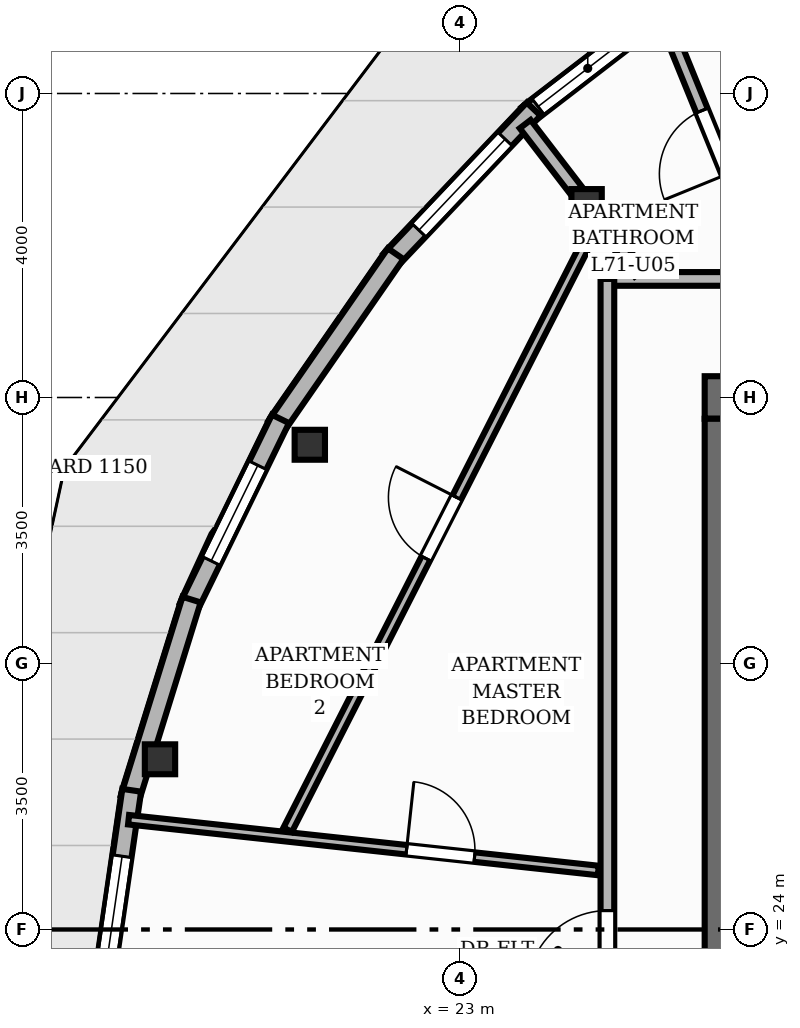
"""IFC4 building model, lengths in metres.
Left out: names, types, materials, properties, quantities, classifications, styles, units other than length and angle.
Written with IfcOpenShell. Run it as: python <this file> out.ifc"""

import sys

from ifc_helpers import new_model, si_unit, direction, frame, frame_2d, origin, origin_2d, place, context, subcontext, project, spatial, rectangle, i_section, extrude, element, fill, save


model = new_model("IFC4")
c1 = context("Model", 3, precision=1e-05, world=origin(), true_north=direction((0.0, 1.0)))
c2 = subcontext(c1, "Body", "Model", "MODEL_VIEW")
j1 = project(units=[si_unit("LENGTHUNIT", "METRE"), si_unit("PLANEANGLEUNIT", "RADIAN")], contexts=[c1])
p1 = place(None, origin())
s1 = spatial("IfcSite", under=j1, at=p1, CompositionType="ELEMENT")
p2 = place(p1, origin())
s2 = spatial("IfcBuilding", under=s1, at=p2, CompositionType="ELEMENT")
p3 = place(p2, frame((0.0, 0.0, 236.64)))
s3 = spatial("IfcBuildingStorey", under=s2, at=p3, CompositionType="ELEMENT", Elevation=236.64)
p4 = place(p3, frame((26.22, 31.0, 0.0), z_axis=(0.0, 0.0, 1.0), x_axis=(1.0, 0.0, 0.0)))
e1 = element("IfcWall", 1, at=p4, inside=s3, PredefinedType="SHEAR", context=c2, shape_type="SweptSolid", body=[
    extrude(rectangle(XDim=11.56, YDim=0.56, at=frame_2d((5.78, 0.0))), origin(), (0.0, 0.0, 1.0), 3.2),
])
p5 = place(p4, frame((8.18, 0.0, 0.0)))
e2 = element("IfcOpeningElement", 2, at=p5, cuts=e1, PredefinedType="OPENING", context=c2, shape_type="SweptSolid", body=[
    extrude(rectangle(XDim=1.1, YDim=2.15, at=frame_2d((0.55, 1.075))), frame((0.0, 0.29, 0.0), z_axis=(0.0, -1.0, 0.0), x_axis=(1.0, 0.0, 0.0)), (0.0, 0.0, 1.0), 0.58),
])
p6 = place(p4, frame((0.805, 0.0, 0.0)))
e3 = element("IfcOpeningElement", 3, at=p6, cuts=e1, PredefinedType="OPENING", context=c2, shape_type="SweptSolid", body=[
    extrude(rectangle(XDim=1.05, YDim=2.15, at=frame_2d((0.525, 1.075))), frame((0.0, 0.29, 0.0), z_axis=(0.0, -1.0, 0.0), x_axis=(1.0, 0.0, 0.0)), (0.0, 0.0, 1.0), 0.58),
])
p7 = place(p4, frame((2.555, 0.0, 0.0)))
e4 = element("IfcOpeningElement", 4, at=p7, cuts=e1, PredefinedType="OPENING", context=c2, shape_type="SweptSolid", body=[
    extrude(rectangle(XDim=1.05, YDim=2.15, at=frame_2d((0.525, 1.075))), frame((0.0, 0.29, 0.0), z_axis=(0.0, -1.0, 0.0), x_axis=(1.0, 0.0, 0.0)), (0.0, 0.0, 1.0), 0.58),
])
p8 = place(p4, frame((4.305, 0.0, 0.0)))
e5 = element("IfcOpeningElement", 5, at=p8, cuts=e1, PredefinedType="OPENING", context=c2, shape_type="SweptSolid", body=[
    extrude(rectangle(XDim=1.05, YDim=2.15, at=frame_2d((0.525, 1.075))), frame((0.0, 0.29, 0.0), z_axis=(0.0, -1.0, 0.0), x_axis=(1.0, 0.0, 0.0)), (0.0, 0.0, 1.0), 0.58),
])
p9 = place(p3, frame((26.5, 17.28, 0.0), z_axis=(0.0, 0.0, 1.0), x_axis=(0.0, 1.0, 0.0)))
e6 = element("IfcWall", 6, at=p9, inside=s3, PredefinedType="SHEAR", context=c2, shape_type="SweptSolid", body=[
    extrude(rectangle(XDim=13.44, YDim=0.56, at=frame_2d((6.72, 0.0))), origin(), (0.0, 0.0, 1.0), 3.2),
])
for number, where, z_axis, x_axis in (
    (7, (24.667, 33.545, 0.0), (0.0, 0.0, 1.0), (1.0, 0.0, 0.0)),
    (8, (21.025, 30.378, 0.0), (0.0, 0.0, 1.0), (1.0, 0.0, 0.0)),
    (9, (19.054, 26.24, 0.0), (0.0, 0.0, 1.0), (1.0, 0.0, 0.0)),
):
    element("IfcColumn", number, at=place(p3, frame(where, z_axis=z_axis, x_axis=x_axis)), inside=s3, PredefinedType="COLUMN", context=c2, shape_type="SweptSolid", body=[
        extrude(i_section(OverallWidth=0.399, OverallDepth=0.394, WebThickness=0.023, FlangeThickness=0.037, at=origin_2d()), origin(), (0.0, 0.0, 1.0), 3.2),
    ])
p10 = place(p3, frame((23.889, 34.721, 0.0), z_axis=(0.0, 0.0, 1.0), x_axis=(0.792543354822, 0.609815571076, 0.0)))
e10 = element("IfcWall", 10, at=p10, inside=s3, PredefinedType="SOLIDWALL", context=c2, shape_type="SweptSolid", body=[
    extrude(rectangle(XDim=2.702, YDim=0.25, at=frame_2d((1.351, 0.0))), origin(), (0.0, 0.0, 1.0), 2.96),
])
p11 = place(p10, frame((0.175, 0.0, 0.85)))
e11 = element("IfcOpeningElement", 11, at=p11, cuts=e10, PredefinedType="OPENING", context=c2, shape_type="SweptSolid", body=[
    extrude(rectangle(XDim=1.65, YDim=1.52, at=frame_2d((0.825, 0.76))), frame((0.0, 0.135, 0.0), z_axis=(0.0, -1.0, 0.0), x_axis=(1.0, 0.0, 0.0)), (0.0, 0.0, 1.0), 0.27),
])
p12 = place(p3, frame((22.085, 32.807, 0.0), z_axis=(0.0, 0.0, 1.0), x_axis=(0.688046261031, 0.725666826223, 0.0)))
e12 = element("IfcWall", 12, at=p12, inside=s3, PredefinedType="SOLIDWALL", context=c2, shape_type="SweptSolid", body=[
    extrude(rectangle(XDim=2.739, YDim=0.25, at=frame_2d((1.369, 0.0))), origin(), (0.0, 0.0, 1.0), 2.96),
])
p13 = place(p12, frame((0.544, 0.0, 0.85)))
e13 = element("IfcOpeningElement", 13, at=p13, cuts=e12, PredefinedType="OPENING", context=c2, shape_type="SweptSolid", body=[
    extrude(rectangle(XDim=1.65, YDim=1.55, at=frame_2d((0.825, 0.775))), frame((0.0, 0.135, 0.0), z_axis=(0.0, -1.0, 0.0), x_axis=(1.0, 0.0, 0.0)), (0.0, 0.0, 1.0), 0.27),
])
p14 = place(p3, frame((20.584, 30.624, 0.0), z_axis=(0.0, 0.0, 1.0), x_axis=(0.569421689582, 0.822045582333, 0.0)))
e14 = element("IfcWall", 14, at=p14, inside=s3, PredefinedType="SOLIDWALL", context=c2, shape_type="SweptSolid", body=[
    extrude(rectangle(XDim=2.758, YDim=0.25, at=frame_2d((1.379, 0.0))), origin(), (0.0, 0.0, 1.0), 2.96),
])
p15 = place(p3, frame((19.429, 28.239, 0.0), z_axis=(0.0, 0.0, 1.0), x_axis=(0.438517804861, 0.898722501565, 0.0)))
e15 = element("IfcWall", 15, at=p15, inside=s3, PredefinedType="SOLIDWALL", context=c2, shape_type="SweptSolid", body=[
    extrude(rectangle(XDim=2.758, YDim=0.25, at=frame_2d((1.379, 0.0))), origin(), (0.0, 0.0, 1.0), 2.96),
])
p16 = place(p15, frame((0.679, 0.0, 0.85)))
e16 = element("IfcOpeningElement", 16, at=p16, cuts=e15, PredefinedType="OPENING", context=c2, shape_type="SweptSolid", body=[
    extrude(rectangle(XDim=1.4, YDim=1.55, at=frame_2d((0.7, 0.775))), frame((0.0, 0.135, 0.0), z_axis=(0.0, -1.0, 0.0), x_axis=(1.0, 0.0, 0.0)), (0.0, 0.0, 1.0), 0.27),
])
p17 = place(p3, frame((18.657, 25.725, 0.0), z_axis=(0.0, 0.0, 1.0), x_axis=(0.29642164717, 0.955057174775, 0.0)))
e17 = element("IfcWall", 17, at=p17, inside=s3, PredefinedType="SOLIDWALL", context=c2, shape_type="SweptSolid", body=[
    extrude(rectangle(XDim=2.739, YDim=0.25, at=frame_2d((1.369, 0.0))), origin(), (0.0, 0.0, 1.0), 2.577),
])
p18 = place(p3, frame((18.292, 23.158, 0.0), z_axis=(0.0, 0.0, 1.0), x_axis=(0.144229466115, 0.989544269401, 0.0)))
e18 = element("IfcWall", 18, at=p18, inside=s3, PredefinedType="SOLIDWALL", context=c2, shape_type="SweptSolid", body=[
    extrude(rectangle(XDim=2.702, YDim=0.25, at=frame_2d((1.351, 0.0))), origin(), (0.0, 0.0, 1.0), 2.577),
])
p19 = place(p18, frame((0.175, 0.0, 0.85)))
e19 = element("IfcOpeningElement", 19, at=p19, cuts=e18, PredefinedType="OPENING", context=c2, shape_type="SweptSolid", body=[
    extrude(rectangle(XDim=1.65, YDim=1.55, at=frame_2d((0.825, 0.775))), frame((0.0, 0.135, 0.0), z_axis=(0.0, -1.0, 0.0), x_axis=(1.0, 0.0, 0.0)), (0.0, 0.0, 1.0), 0.27),
])
p20 = place(p3, frame((24.533, 33.719, 0.0), z_axis=(0.0, 0.0, 1.0), x_axis=(-0.609209464238, 0.793009349682, 0.0)))
e20 = element("IfcWall", 20, at=p20, inside=s3, PredefinedType="PARTITIONING", context=c2, shape_type="SweptSolid", body=[
    extrude(rectangle(XDim=1.106, YDim=0.18, at=frame_2d((0.553, 0.0))), origin(), (0.0, 0.0, 1.0), 2.404),
])
p21 = place(p3, frame((24.94, 32.56, 0.0), z_axis=(0.0, 0.0, 1.0), x_axis=(1.0, 0.0, 0.0)))
e21 = element("IfcWall", 21, at=p21, inside=s3, PredefinedType="PARTITIONING", context=c2, shape_type="SweptSolid", body=[
    extrude(rectangle(XDim=5.672, YDim=0.18, at=frame_2d((2.836, 0.0))), origin(), (0.0, 0.0, 1.0), 2.955),
])
p22 = place(p21, frame((3.373, 0.0, 0.0)))
e22 = element("IfcOpeningElement", 22, at=p22, cuts=e21, PredefinedType="OPENING", context=c2, shape_type="SweptSolid", body=[
    extrude(rectangle(XDim=1.05, YDim=2.15, at=frame_2d((0.525, 1.075))), frame((0.0, 0.1, 0.0), z_axis=(0.0, -1.0, 0.0), x_axis=(1.0, 0.0, 0.0)), (0.0, 0.0, 1.0), 0.2),
])
p23 = place(p3, frame((24.94, 22.664, 0.0), z_axis=(0.0, 0.0, 1.0), x_axis=(0.0, 1.0, 0.0)))
e23 = element("IfcWall", 23, at=p23, inside=s3, PredefinedType="PARTITIONING", context=c2, shape_type="SweptSolid", body=[
    extrude(rectangle(XDim=9.896, YDim=0.18, at=frame_2d((4.948, 0.0))), origin(), (0.0, 0.0, 1.0), 2.955),
])
p24 = place(p23, frame((0.535, 0.0, 0.0)))
e24 = element("IfcOpeningElement", 24, at=p24, cuts=e23, PredefinedType="OPENING", context=c2, shape_type="SweptSolid", body=[
    extrude(rectangle(XDim=1.05, YDim=2.15, at=frame_2d((0.525, 1.075))), frame((0.0, 0.1, 0.0), z_axis=(0.0, -1.0, 0.0), x_axis=(1.0, 0.0, 0.0)), (0.0, 0.0, 1.0), 0.2),
])
p25 = place(p3, frame((27.049, 32.653, 0.0), z_axis=(0.0, 0.0, 1.0), x_axis=(-0.377313729351, 0.92608549802, 0.0)))
e25 = element("IfcWall", 25, at=p25, inside=s3, PredefinedType="PLUMBINGWALL", context=c2, shape_type="SweptSolid", body=[
    extrude(rectangle(XDim=3.684, YDim=0.16, at=frame_2d((1.842, 0.0))), origin(), (0.0, 0.0, 1.0), 2.692),
])
p26 = place(p25, frame((1.392, 0.0, 0.0)))
e26 = element("IfcOpeningElement", 26, at=p26, cuts=e25, PredefinedType="OPENING", context=c2, shape_type="SweptSolid", body=[
    extrude(rectangle(XDim=0.9, YDim=2.1, at=frame_2d((0.45, 1.05))), frame((0.0, 0.09, 0.0), z_axis=(0.0, -1.0, 0.0), x_axis=(1.0, 0.0, 0.0)), (0.0, 0.0, 1.0), 0.18),
])
p27 = place(p3, frame((25.363, 32.639, 0.0), z_axis=(0.0, 0.0, 1.0), x_axis=(-0.609243305896, 0.792983350532, 0.0)))
e27 = element("IfcWall", 27, at=p27, inside=s3, PredefinedType="PLUMBINGWALL", context=c2, shape_type="SweptSolid", body=[
    extrude(rectangle(XDim=0.909, YDim=0.16, at=frame_2d((0.455, 0.0))), origin(), (0.0, 0.0, 1.0), 2.404),
])
p28 = place(p3, frame((18.64, 25.445, 0.0), z_axis=(0.0, 0.0, 1.0), x_axis=(0.994206026696, -0.107491285604, 0.0)))
e28 = element("IfcWall", 28, at=p28, inside=s3, PredefinedType="PARTITIONING", context=c2, shape_type="SweptSolid", body=[
    extrude(rectangle(XDim=6.217, YDim=0.125, at=frame_2d((3.108, 0.0))), origin(), (0.0, 0.0, 1.0), 2.955),
])
p29 = place(p28, frame((3.678, 0.0, 0.0)))
e29 = element("IfcOpeningElement", 29, at=p29, cuts=e28, PredefinedType="OPENING", context=c2, shape_type="SweptSolid", body=[
    extrude(rectangle(XDim=0.9, YDim=2.1, at=frame_2d((0.45, 1.05))), frame((0.0, 0.073, 0.0), z_axis=(0.0, -1.0, 0.0), x_axis=(1.0, 0.0, 0.0)), (0.0, 0.0, 1.0), 0.145),
])
p30 = place(p3, frame((20.734, 25.312, 0.0), z_axis=(0.0, 0.0, 1.0), x_axis=(0.45353588766, 0.891238014564, 0.0)))
e30 = element("IfcWall", 30, at=p30, inside=s3, PredefinedType="PARTITIONING", context=c2, shape_type="SweptSolid", body=[
    extrude(rectangle(XDim=8.912, YDim=0.125, at=frame_2d((4.456, 0.0))), origin(), (0.0, 0.0, 1.0), 2.955),
])
p31 = place(p30, frame((4.006, 0.0, 0.0)))
e31 = element("IfcOpeningElement", 31, at=p31, cuts=e30, PredefinedType="OPENING", context=c2, shape_type="SweptSolid", body=[
    extrude(rectangle(XDim=0.9, YDim=2.1, at=frame_2d((0.45, 1.05))), frame((0.0, 0.073, 0.0), z_axis=(0.0, -1.0, 0.0), x_axis=(1.0, 0.0, 0.0)), (0.0, 0.0, 1.0), 0.145),
])
p32 = place(p11, origin())
e32 = element("IfcWindow", 32, at=p32, inside=s3, PartitioningType="SINGLE_PANEL", PredefinedType="WINDOW", context=c2, shape_type="SweptSolid", body=[
    extrude(rectangle(XDim=1.65, YDim=1.52, at=frame_2d((0.825, 0.76))), frame((0.0, 0.03, 0.0), z_axis=(0.0, -1.0, 0.0), x_axis=(1.0, 0.0, 0.0)), (0.0, 0.0, 1.0), 0.06),
])
fill(e11, e32)
p33 = place(p13, origin())
e33 = element("IfcWindow", 33, at=p33, inside=s3, PartitioningType="SINGLE_PANEL", PredefinedType="WINDOW", context=c2, shape_type="SweptSolid", body=[
    extrude(rectangle(XDim=1.65, YDim=1.55, at=frame_2d((0.825, 0.775))), frame((0.0, 0.03, 0.0), z_axis=(0.0, -1.0, 0.0), x_axis=(1.0, 0.0, 0.0)), (0.0, 0.0, 1.0), 0.06),
])
fill(e13, e33)
p34 = place(p16, origin())
e34 = element("IfcWindow", 34, at=p34, inside=s3, PartitioningType="SINGLE_PANEL", PredefinedType="WINDOW", context=c2, shape_type="SweptSolid", body=[
    extrude(rectangle(XDim=1.4, YDim=1.55, at=frame_2d((0.7, 0.775))), frame((0.0, 0.03, 0.0), z_axis=(0.0, -1.0, 0.0), x_axis=(1.0, 0.0, 0.0)), (0.0, 0.0, 1.0), 0.06),
])
fill(e16, e34)
p35 = place(p19, origin())
e35 = element("IfcWindow", 35, at=p35, inside=s3, PartitioningType="SINGLE_PANEL", PredefinedType="WINDOW", context=c2, shape_type="SweptSolid", body=[
    extrude(rectangle(XDim=1.65, YDim=1.55, at=frame_2d((0.825, 0.775))), frame((0.0, 0.03, 0.0), z_axis=(0.0, -1.0, 0.0), x_axis=(1.0, 0.0, 0.0)), (0.0, 0.0, 1.0), 0.06),
])
fill(e19, e35)
p36 = place(p26, origin())
e36 = element("IfcDoor", 36, at=p36, inside=s3, OperationType="SINGLE_SWING_LEFT", PredefinedType="DOOR", context=c2, shape_type="SweptSolid", body=[
    extrude(rectangle(XDim=0.9, YDim=2.1, at=frame_2d((0.45, 1.05))), frame((0.0, 0.025, 0.0), z_axis=(0.0, -1.0, 0.0), x_axis=(1.0, 0.0, 0.0)), (0.0, 0.0, 1.0), 0.05),
])
fill(e26, e36)
p37 = place(p24, origin())
e37 = element("IfcDoor", 37, at=p37, inside=s3, OperationType="SINGLE_SWING_LEFT", PredefinedType="DOOR", context=c2, shape_type="SweptSolid", body=[
    extrude(rectangle(XDim=1.05, YDim=2.15, at=frame_2d((0.525, 1.075))), frame((0.0, 0.025, 0.0), z_axis=(0.0, -1.0, 0.0), x_axis=(1.0, 0.0, 0.0)), (0.0, 0.0, 1.0), 0.05),
])
fill(e24, e37)
p38 = place(p29, origin())
e38 = element("IfcDoor", 38, at=p38, inside=s3, OperationType="SINGLE_SWING_LEFT", PredefinedType="DOOR", context=c2, shape_type="SweptSolid", body=[
    extrude(rectangle(XDim=0.9, YDim=2.1, at=frame_2d((0.45, 1.05))), frame((0.0, 0.025, 0.0), z_axis=(0.0, -1.0, 0.0), x_axis=(1.0, 0.0, 0.0)), (0.0, 0.0, 1.0), 0.05),
])
fill(e29, e38)
p39 = place(p31, origin())
e39 = element("IfcDoor", 39, at=p39, inside=s3, OperationType="SINGLE_SWING_RIGHT", PredefinedType="DOOR", context=c2, shape_type="SweptSolid", body=[
    extrude(rectangle(XDim=0.9, YDim=2.1, at=frame_2d((0.45, 1.05))), frame((0.0, 0.025, 0.0), z_axis=(0.0, -1.0, 0.0), x_axis=(1.0, 0.0, 0.0)), (0.0, 0.0, 1.0), 0.05),
])
fill(e31, e39)
save(model, sys.argv[1])
